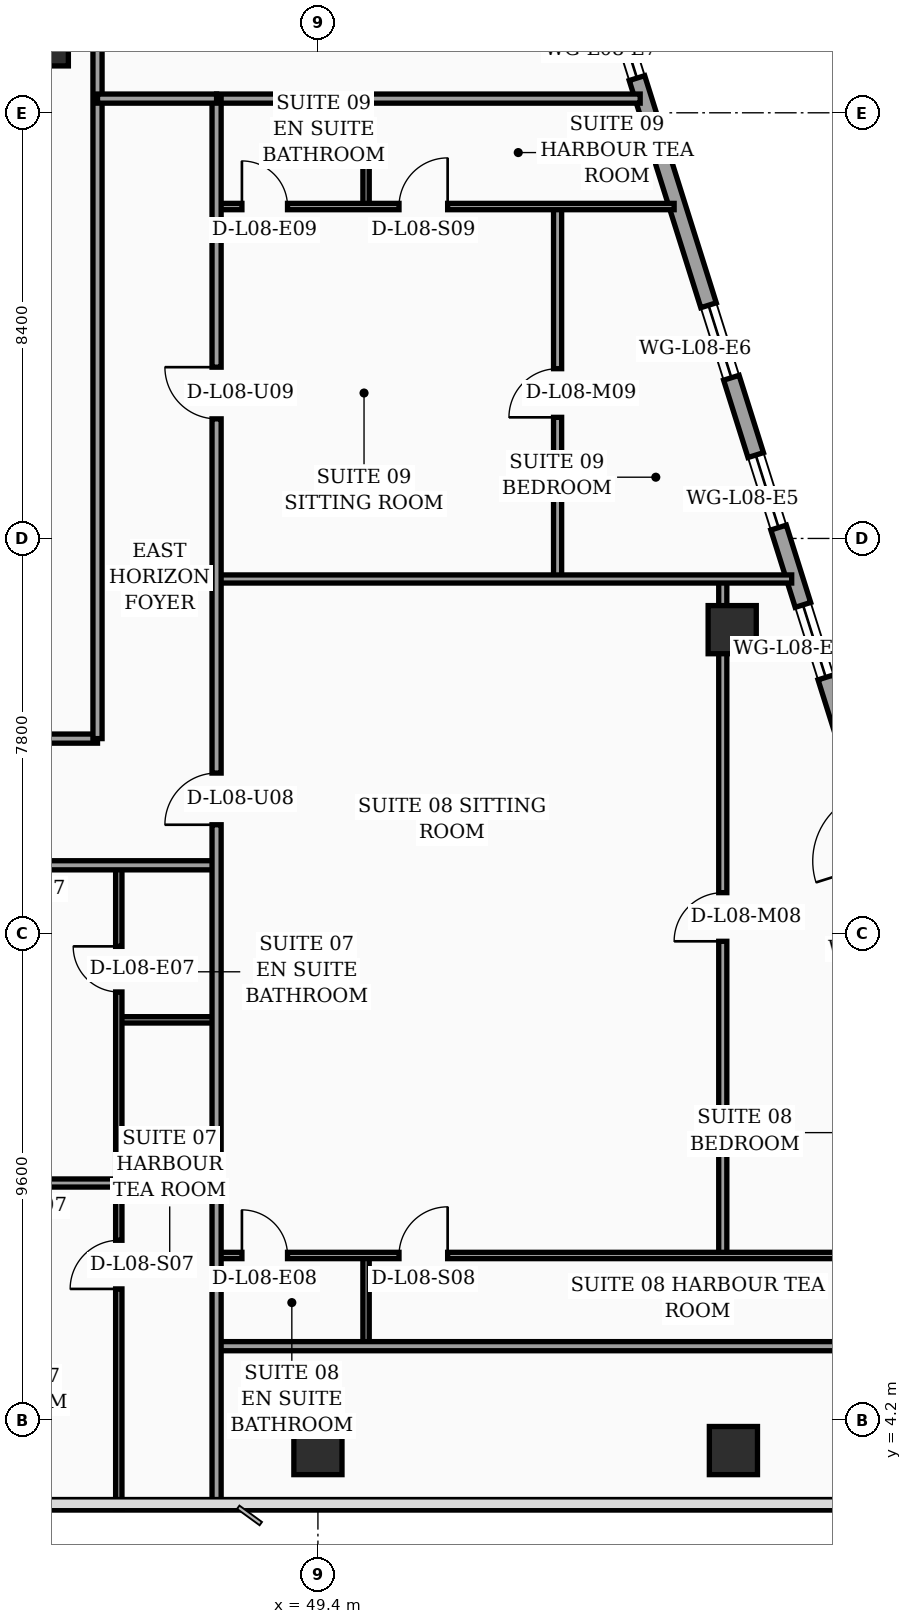
"""IFC4 building model, lengths in metres.
Left out: names, types, materials, properties, quantities, classifications, styles, units other than length and angle.
Written with IfcOpenShell. Run it as: python <this file> out.ifc"""

import sys

from ifc_helpers import new_model, si_unit, direction, frame, frame_2d, origin, origin_2d, place, context, subcontext, project, spatial, rectangle, hollow_rectangle, extrude, element, fill, save


model = new_model("IFC4")
c1 = context("Model", 3, precision=1e-05, world=origin(), true_north=direction((0.0, 1.0)))
c2 = subcontext(c1, "Body", "Model", "MODEL_VIEW")
j1 = project(units=[si_unit("LENGTHUNIT", "METRE"), si_unit("PLANEANGLEUNIT", "RADIAN")], contexts=[c1])
p1 = place(None, origin())
s1 = spatial("IfcSite", under=j1, at=p1, CompositionType="ELEMENT")
p2 = place(p1, origin())
s2 = spatial("IfcBuilding", under=s1, at=p2, CompositionType="ELEMENT")
p3 = place(p2, frame((0.0, 0.0, 38.4)))
s3 = spatial("IfcBuildingStorey", under=s2, at=p3, CompositionType="ELEMENT", Elevation=38.4)
for number, where, z_axis, x_axis in (
    (1, (49.4, 3.6, 0.0), (0.0, 0.0, 1.0), (1.0, 0.0, 0.0)),
    (2, (57.6, 3.6, 0.0), (0.0, 0.0, 1.0), (1.0, 0.0, 0.0)),
    (3, (44.0, 31.4, 0.0), (0.0, 0.0, 1.0), (1.0, 0.0, 0.0)),
    (4, (57.576, 19.8, 0.0), (0.0, 0.0, 1.0), (1.0, 0.0, 0.0)),
):
    element("IfcColumn", number, at=place(p3, frame(where, z_axis=z_axis, x_axis=x_axis)), inside=s3, PredefinedType="COLUMN", context=c2, shape_type="SweptSolid", body=[
        extrude(hollow_rectangle(XDim=0.95, YDim=0.95, WallThickness=0.04, at=origin_2d()), origin(), (0.0, 0.0, 1.0), 3.56),
    ])
p4 = place(p3, frame((63.63, 5.505, 0.0), z_axis=(0.0, 0.0, 1.0), x_axis=(-0.300501856448, 0.953781229775, 0.0)))
e5 = element("IfcWall", 5, at=p4, inside=s3, PredefinedType="SOLIDWALL", context=c2, shape_type="SweptSolid", body=[
    extrude(rectangle(XDim=30.814, YDim=0.32, at=frame_2d((15.407, 0.0))), origin(), (0.0, 0.0, 1.0), 3.56),
])
p5 = place(p4, frame((10.199, 0.0, 0.0)))
e6 = element("IfcOpeningElement", 6, at=p5, cuts=e5, PredefinedType="OPENING", context=c2, shape_type="SweptSolid", body=[
    extrude(rectangle(XDim=1.4, YDim=2.25, at=frame_2d((0.7, 1.125))), frame((0.0, 0.17, 0.0), z_axis=(0.0, -1.0, 0.0), x_axis=(1.0, 0.0, 0.0)), (0.0, 0.0, 1.0), 0.34),
])
p6 = place(p4, frame((2.65, 0.0, 0.75)))
e7 = element("IfcOpeningElement", 7, at=p6, cuts=e5, PredefinedType="OPENING", context=c2, shape_type="SweptSolid", body=[
    extrude(rectangle(XDim=1.5, YDim=1.6, at=frame_2d((0.75, 0.8))), frame((0.0, 0.17, 0.0), z_axis=(0.0, -1.0, 0.0), x_axis=(1.0, 0.0, 0.0)), (0.0, 0.0, 1.0), 0.34),
])
p7 = place(p4, frame((4.7, 0.0, 0.75)))
e8 = element("IfcOpeningElement", 8, at=p7, cuts=e5, PredefinedType="OPENING", context=c2, shape_type="SweptSolid", body=[
    extrude(rectangle(XDim=1.5, YDim=1.6, at=frame_2d((0.75, 0.8))), frame((0.0, 0.17, 0.0), z_axis=(0.0, -1.0, 0.0), x_axis=(1.0, 0.0, 0.0)), (0.0, 0.0, 1.0), 0.34),
])
p8 = place(p4, frame((7.8, 0.0, 0.75)))
e9 = element("IfcOpeningElement", 9, at=p8, cuts=e5, PredefinedType="OPENING", context=c2, shape_type="SweptSolid", body=[
    extrude(rectangle(XDim=1.5, YDim=1.6, at=frame_2d((0.75, 0.8))), frame((0.0, 0.17, 0.0), z_axis=(0.0, -1.0, 0.0), x_axis=(1.0, 0.0, 0.0)), (0.0, 0.0, 1.0), 0.34),
])
p9 = place(p4, frame((14.0, 0.0, 0.75)))
e10 = element("IfcOpeningElement", 10, at=p9, cuts=e5, PredefinedType="OPENING", context=c2, shape_type="SweptSolid", body=[
    extrude(rectangle(XDim=1.5, YDim=1.6, at=frame_2d((0.75, 0.8))), frame((0.0, 0.17, 0.0), z_axis=(0.0, -1.0, 0.0), x_axis=(1.0, 0.0, 0.0)), (0.0, 0.0, 1.0), 0.34),
])
p10 = place(p4, frame((17.1, 0.0, 0.75)))
e11 = element("IfcOpeningElement", 11, at=p10, cuts=e5, PredefinedType="OPENING", context=c2, shape_type="SweptSolid", body=[
    extrude(rectangle(XDim=1.5, YDim=1.6, at=frame_2d((0.75, 0.8))), frame((0.0, 0.17, 0.0), z_axis=(0.0, -1.0, 0.0), x_axis=(1.0, 0.0, 0.0)), (0.0, 0.0, 1.0), 0.34),
])
p11 = place(p4, frame((20.2, 0.0, 0.75)))
e12 = element("IfcOpeningElement", 12, at=p11, cuts=e5, PredefinedType="OPENING", context=c2, shape_type="SweptSolid", body=[
    extrude(rectangle(XDim=1.5, YDim=1.6, at=frame_2d((0.75, 0.8))), frame((0.0, 0.17, 0.0), z_axis=(0.0, -1.0, 0.0), x_axis=(1.0, 0.0, 0.0)), (0.0, 0.0, 1.0), 0.34),
])
p12 = place(p4, frame((26.4, 0.0, 0.75)))
e13 = element("IfcOpeningElement", 13, at=p12, cuts=e5, PredefinedType="OPENING", context=c2, shape_type="SweptSolid", body=[
    extrude(rectangle(XDim=1.5, YDim=1.6, at=frame_2d((0.75, 0.8))), frame((0.0, 0.17, 0.0), z_axis=(0.0, -1.0, 0.0), x_axis=(1.0, 0.0, 0.0)), (0.0, 0.0, 1.0), 0.34),
])
p13 = place(p3, frame((45.47, 12.1, 0.0), z_axis=(0.0, 0.0, 1.0), x_axis=(1.0, 0.0, 0.0)))
e14 = element("IfcWall", 14, at=p13, inside=s3, PredefinedType="PARTITIONING", context=c2, shape_type="SweptSolid", body=[
    extrude(rectangle(XDim=1.93, YDim=0.125, at=frame_2d((0.965, 0.0))), origin(), (0.0, 0.0, 1.0), 2.84),
])
p14 = place(p3, frame((41.25, 8.88, 0.0), z_axis=(0.0, 0.0, 1.0), x_axis=(1.0, 0.0, 0.0)))
e15 = element("IfcWall", 15, at=p14, inside=s3, PredefinedType="PARTITIONING", context=c2, shape_type="SweptSolid", body=[
    extrude(rectangle(XDim=4.22, YDim=0.16, at=frame_2d((2.11, 0.0))), origin(), (0.0, 0.0, 1.0), 3.56),
])
p15 = place(p14, frame((1.63, 0.0, 0.0)))
e16 = element("IfcOpeningElement", 16, at=p15, cuts=e15, PredefinedType="OPENING", context=c2, shape_type="SweptSolid", body=[
    extrude(rectangle(XDim=0.96, YDim=2.2, at=frame_2d((0.48, 1.1))), frame((0.0, 0.09, 0.0), z_axis=(0.0, -1.0, 0.0), x_axis=(1.0, 0.0, 0.0)), (0.0, 0.0, 1.0), 0.18),
])
p16 = place(p3, frame((45.47, 2.44, 0.0), z_axis=(0.0, 0.0, 1.0), x_axis=(0.0, 1.0, 0.0)))
e17 = element("IfcWall", 17, at=p16, inside=s3, PredefinedType="PARTITIONING", context=c2, shape_type="SweptSolid", body=[
    extrude(rectangle(XDim=12.71, YDim=0.125, at=frame_2d((6.355, 0.0))), origin(), (0.0, 0.0, 1.0), 3.04),
])
p17 = place(p16, frame((4.35, 0.0, 0.0)))
e18 = element("IfcOpeningElement", 18, at=p17, cuts=e17, PredefinedType="OPENING", context=c2, shape_type="SweptSolid", body=[
    extrude(rectangle(XDim=0.96, YDim=2.2, at=frame_2d((0.48, 1.1))), frame((0.0, 0.073, 0.0), z_axis=(0.0, -1.0, 0.0), x_axis=(1.0, 0.0, 0.0)), (0.0, 0.0, 1.0), 0.145),
])
p18 = place(p16, frame((10.21, 0.0, 0.0)))
e19 = element("IfcOpeningElement", 19, at=p18, cuts=e17, PredefinedType="OPENING", context=c2, shape_type="SweptSolid", body=[
    extrude(rectangle(XDim=0.9, YDim=2.15, at=frame_2d((0.45, 1.075))), frame((0.0, 0.073, 0.0), z_axis=(0.0, -1.0, 0.0), x_axis=(1.0, 0.0, 0.0)), (0.0, 0.0, 1.0), 0.145),
])
p19 = place(p3, frame((32.4, 15.15, 0.0), z_axis=(0.0, 0.0, 1.0), x_axis=(1.0, 0.0, 0.0)))
e20 = element("IfcWall", 20, at=p19, inside=s3, PredefinedType="PARTITIONING", context=c2, shape_type="SweptSolid", body=[
    extrude(rectangle(XDim=15.0, YDim=0.18, at=frame_2d((7.5, 0.0))), origin(), (0.0, 0.0, 1.0), 2.84),
])
p20 = place(p19, frame((2.95, 0.0, 0.0)))
e21 = element("IfcOpeningElement", 21, at=p20, cuts=e20, PredefinedType="OPENING", context=c2, shape_type="SweptSolid", body=[
    extrude(rectangle(XDim=1.02, YDim=2.2, at=frame_2d((0.51, 1.1))), frame((0.0, 0.1, 0.0), z_axis=(0.0, -1.0, 0.0), x_axis=(1.0, 0.0, 0.0)), (0.0, 0.0, 1.0), 0.2),
])
p21 = place(p19, frame((10.45, 0.0, 0.0)))
e22 = element("IfcOpeningElement", 22, at=p21, cuts=e20, PredefinedType="OPENING", context=c2, shape_type="SweptSolid", body=[
    extrude(rectangle(XDim=1.02, YDim=2.2, at=frame_2d((0.51, 1.1))), frame((0.0, 0.1, 0.0), z_axis=(0.0, -1.0, 0.0), x_axis=(1.0, 0.0, 0.0)), (0.0, 0.0, 1.0), 0.2),
])
p22 = place(p3, frame((21.5, 17.65, 0.0), z_axis=(0.0, 0.0, 1.0), x_axis=(1.0, 0.0, 0.0)))
e23 = element("IfcWall", 23, at=p22, inside=s3, PredefinedType="PARTITIONING", context=c2, shape_type="SweptSolid", body=[
    extrude(rectangle(XDim=23.55, YDim=0.18, at=frame_2d((11.775, 0.0))), origin(), (0.0, 0.0, 1.0), 2.84),
])
p23 = place(p22, frame((0.95, 0.0, 0.0)))
e24 = element("IfcOpeningElement", 24, at=p23, cuts=e23, PredefinedType="OPENING", context=c2, shape_type="SweptSolid", body=[
    extrude(rectangle(XDim=1.02, YDim=2.2, at=frame_2d((0.51, 1.1))), frame((0.0, 0.1, 0.0), z_axis=(0.0, -1.0, 0.0), x_axis=(1.0, 0.0, 0.0)), (0.0, 0.0, 1.0), 0.2),
])
p24 = place(p22, frame((9.42, 0.0, 0.0)))
e25 = element("IfcOpeningElement", 25, at=p24, cuts=e23, PredefinedType="OPENING", context=c2, shape_type="SweptSolid", body=[
    extrude(rectangle(XDim=1.02, YDim=2.2, at=frame_2d((0.51, 1.1))), frame((0.0, 0.1, 0.0), z_axis=(0.0, -1.0, 0.0), x_axis=(1.0, 0.0, 0.0)), (0.0, 0.0, 1.0), 0.2),
])
p25 = place(p22, frame((16.58, 0.0, 0.0)))
e26 = element("IfcOpeningElement", 26, at=p25, cuts=e23, PredefinedType="OPENING", context=c2, shape_type="SweptSolid", body=[
    extrude(rectangle(XDim=1.02, YDim=2.2, at=frame_2d((0.51, 1.1))), frame((0.0, 0.1, 0.0), z_axis=(0.0, -1.0, 0.0), x_axis=(1.0, 0.0, 0.0)), (0.0, 0.0, 1.0), 0.2),
])
p26 = place(p3, frame((45.05, 17.65, 0.0), z_axis=(0.0, 0.0, 1.0), x_axis=(0.0, 1.0, 0.0)))
e27 = element("IfcWall", 27, at=p26, inside=s3, PredefinedType="PARTITIONING", context=c2, shape_type="SweptSolid", body=[
    extrude(rectangle(XDim=17.9, YDim=0.18, at=frame_2d((8.95, 0.0))), origin(), (0.0, 0.0, 1.0), 2.84),
])
p27 = place(p3, frame((50.35, 5.66, 0.0), z_axis=(0.0, 0.0, 1.0), x_axis=(0.0, 1.0, 0.0)))
e28 = element("IfcWall", 28, at=p27, inside=s3, PredefinedType="PARTITIONING", context=c2, shape_type="SweptSolid", body=[
    extrude(rectangle(XDim=1.79, YDim=0.125, at=frame_2d((0.895, 0.0))), origin(), (0.0, 0.0, 1.0), 3.56),
])
p28 = place(p3, frame((57.39, 7.45, 0.0), z_axis=(0.0, 0.0, 1.0), x_axis=(0.0, 1.0, 0.0)))
e29 = element("IfcWall", 29, at=p28, inside=s3, PredefinedType="PARTITIONING", context=c2, shape_type="SweptSolid", body=[
    extrude(rectangle(XDim=13.35, YDim=0.16, at=frame_2d((6.675, 0.0))), origin(), (0.0, 0.0, 1.0), 2.84),
])
p29 = place(p28, frame((6.2, 0.0, 0.0)))
e30 = element("IfcOpeningElement", 30, at=p29, cuts=e29, PredefinedType="OPENING", context=c2, shape_type="SweptSolid", body=[
    extrude(rectangle(XDim=0.96, YDim=2.2, at=frame_2d((0.48, 1.1))), frame((0.0, 0.09, 0.0), z_axis=(0.0, -1.0, 0.0), x_axis=(1.0, 0.0, 0.0)), (0.0, 0.0, 1.0), 0.18),
])
p30 = place(p3, frame((47.4, 7.45, 0.0), z_axis=(0.0, 0.0, 1.0), x_axis=(1.0, 0.0, 0.0)))
e31 = element("IfcWall", 31, at=p30, inside=s3, PredefinedType="PARTITIONING", context=c2, shape_type="SweptSolid", body=[
    extrude(rectangle(XDim=15.56, YDim=0.125, at=frame_2d((7.78, 0.0))), origin(), (0.0, 0.0, 1.0), 2.84),
])
p31 = place(p30, frame((0.5, 0.0, 0.0)))
e32 = element("IfcOpeningElement", 32, at=p31, cuts=e31, PredefinedType="OPENING", context=c2, shape_type="SweptSolid", body=[
    extrude(rectangle(XDim=0.9, YDim=2.15, at=frame_2d((0.45, 1.075))), frame((0.0, 0.073, 0.0), z_axis=(0.0, -1.0, 0.0), x_axis=(1.0, 0.0, 0.0)), (0.0, 0.0, 1.0), 0.145),
])
p32 = place(p30, frame((3.6, 0.0, 0.0)))
e33 = element("IfcOpeningElement", 33, at=p32, cuts=e31, PredefinedType="OPENING", context=c2, shape_type="SweptSolid", body=[
    extrude(rectangle(XDim=0.96, YDim=2.2, at=frame_2d((0.48, 1.1))), frame((0.0, 0.073, 0.0), z_axis=(0.0, -1.0, 0.0), x_axis=(1.0, 0.0, 0.0)), (0.0, 0.0, 1.0), 0.145),
])
p33 = place(p3, frame((47.4, 5.66, 0.0), z_axis=(0.0, 0.0, 1.0), x_axis=(1.0, 0.0, 0.0)))
e34 = element("IfcWall", 34, at=p33, inside=s3, PredefinedType="PARTITIONING", context=c2, shape_type="SweptSolid", body=[
    extrude(rectangle(XDim=13.0, YDim=0.18, at=frame_2d((6.5, 0.0))), origin(), (0.0, 0.0, 1.0), 2.84),
])
p34 = place(p3, frame((50.35, 28.15, 0.0), z_axis=(0.0, 0.0, 1.0), x_axis=(0.0, 1.0, 0.0)))
e35 = element("IfcWall", 35, at=p34, inside=s3, PredefinedType="PARTITIONING", context=c2, shape_type="SweptSolid", body=[
    extrude(rectangle(XDim=2.13, YDim=0.125, at=frame_2d((1.065, 0.0))), origin(), (0.0, 0.0, 1.0), 3.56),
])
p35 = place(p3, frame((54.13, 20.8, 0.0), z_axis=(0.0, 0.0, 1.0), x_axis=(0.0, 1.0, 0.0)))
e36 = element("IfcWall", 36, at=p35, inside=s3, PredefinedType="PARTITIONING", context=c2, shape_type="SweptSolid", body=[
    extrude(rectangle(XDim=7.35, YDim=0.16, at=frame_2d((3.675, 0.0))), origin(), (0.0, 0.0, 1.0), 3.09),
])
p36 = place(p35, frame((3.19, 0.0, 0.0)))
e37 = element("IfcOpeningElement", 37, at=p36, cuts=e36, PredefinedType="OPENING", context=c2, shape_type="SweptSolid", body=[
    extrude(rectangle(XDim=0.96, YDim=2.2, at=frame_2d((0.48, 1.1))), frame((0.0, 0.09, 0.0), z_axis=(0.0, -1.0, 0.0), x_axis=(1.0, 0.0, 0.0)), (0.0, 0.0, 1.0), 0.18),
])
p37 = place(p3, frame((47.4, 28.15, 0.0), z_axis=(0.0, 0.0, 1.0), x_axis=(1.0, 0.0, 0.0)))
e38 = element("IfcWall", 38, at=p37, inside=s3, PredefinedType="PARTITIONING", context=c2, shape_type="SweptSolid", body=[
    extrude(rectangle(XDim=9.03, YDim=0.125, at=frame_2d((4.515, 0.0))), origin(), (0.0, 0.0, 1.0), 2.84),
])
p38 = place(p37, frame((0.5, 0.0, 0.0)))
e39 = element("IfcOpeningElement", 39, at=p38, cuts=e38, PredefinedType="OPENING", context=c2, shape_type="SweptSolid", body=[
    extrude(rectangle(XDim=0.9, YDim=2.15, at=frame_2d((0.45, 1.075))), frame((0.0, 0.073, 0.0), z_axis=(0.0, -1.0, 0.0), x_axis=(1.0, 0.0, 0.0)), (0.0, 0.0, 1.0), 0.145),
])
p39 = place(p37, frame((3.6, 0.0, 0.0)))
e40 = element("IfcOpeningElement", 40, at=p39, cuts=e38, PredefinedType="OPENING", context=c2, shape_type="SweptSolid", body=[
    extrude(rectangle(XDim=0.96, YDim=2.2, at=frame_2d((0.48, 1.1))), frame((0.0, 0.073, 0.0), z_axis=(0.0, -1.0, 0.0), x_axis=(1.0, 0.0, 0.0)), (0.0, 0.0, 1.0), 0.145),
])
p40 = place(p3, frame((47.4, 20.8, 0.0), z_axis=(0.0, 0.0, 1.0), x_axis=(1.0, 0.0, 0.0)))
e41 = element("IfcWall", 41, at=p40, inside=s3, PredefinedType="PARTITIONING", context=c2, shape_type="SweptSolid", body=[
    extrude(rectangle(XDim=11.35, YDim=0.16, at=frame_2d((5.675, 0.0))), origin(), (0.0, 0.0, 1.0), 3.04),
])
p41 = place(p3, frame((47.4, 30.28, 0.0), z_axis=(0.0, 0.0, 1.0), x_axis=(1.0, 0.0, 0.0)))
e42 = element("IfcWall", 42, at=p41, inside=s3, PredefinedType="PARTITIONING", context=c2, shape_type="SweptSolid", body=[
    extrude(rectangle(XDim=8.36, YDim=0.18, at=frame_2d((4.18, 0.0))), origin(), (0.0, 0.0, 1.0), 2.84),
])
p42 = place(p3, frame((47.4, 2.44, 0.0), z_axis=(0.0, 0.0, 1.0), x_axis=(0.0, 1.0, 0.0)))
e43 = element("IfcWall", 43, at=p42, inside=s3, PredefinedType="PARTITIONING", context=c2, shape_type="SweptSolid", body=[
    extrude(rectangle(XDim=27.84, YDim=0.18, at=frame_2d((13.92, 0.0))), origin(), (0.0, 0.0, 1.0), 2.84),
])
p43 = place(p42, frame((13.51, 0.0, 0.0)))
e44 = element("IfcOpeningElement", 44, at=p43, cuts=e43, PredefinedType="OPENING", context=c2, shape_type="SweptSolid", body=[
    extrude(rectangle(XDim=1.02, YDim=2.2, at=frame_2d((0.51, 1.1))), frame((0.0, 0.1, 0.0), z_axis=(0.0, -1.0, 0.0), x_axis=(1.0, 0.0, 0.0)), (0.0, 0.0, 1.0), 0.2),
])
p44 = place(p42, frame((21.52, 0.0, 0.0)))
e45 = element("IfcOpeningElement", 45, at=p44, cuts=e43, PredefinedType="OPENING", context=c2, shape_type="SweptSolid", body=[
    extrude(rectangle(XDim=1.02, YDim=2.2, at=frame_2d((0.51, 1.1))), frame((0.0, 0.1, 0.0), z_axis=(0.0, -1.0, 0.0), x_axis=(1.0, 0.0, 0.0)), (0.0, 0.0, 1.0), 0.2),
])
p45 = place(p3, frame((45.05, 30.28, 0.0), z_axis=(0.0, 0.0, 1.0), x_axis=(1.0, 0.0, 0.0)))
e46 = element("IfcWall", 46, at=p45, inside=s3, PredefinedType="PARTITIONING", context=c2, shape_type="SweptSolid", body=[
    extrude(rectangle(XDim=2.35, YDim=0.18, at=frame_2d((1.175, 0.0))), origin(), (0.0, 0.0, 1.0), 3.56),
])
p46 = place(p9, origin())
e47 = element("IfcWindow", 47, at=p46, inside=s3, PartitioningType="SINGLE_PANEL", PredefinedType="WINDOW", context=c2, shape_type="SweptSolid", body=[
    extrude(rectangle(XDim=1.5, YDim=1.6, at=frame_2d((0.75, 0.8))), frame((0.0, 0.03, 0.0), z_axis=(0.0, -1.0, 0.0), x_axis=(1.0, 0.0, 0.0)), (0.0, 0.0, 1.0), 0.06),
])
fill(e10, e47)
p47 = place(p10, origin())
e48 = element("IfcWindow", 48, at=p47, inside=s3, PartitioningType="SINGLE_PANEL", PredefinedType="WINDOW", context=c2, shape_type="SweptSolid", body=[
    extrude(rectangle(XDim=1.5, YDim=1.6, at=frame_2d((0.75, 0.8))), frame((0.0, 0.03, 0.0), z_axis=(0.0, -1.0, 0.0), x_axis=(1.0, 0.0, 0.0)), (0.0, 0.0, 1.0), 0.06),
])
fill(e11, e48)
p48 = place(p11, origin())
e49 = element("IfcWindow", 49, at=p48, inside=s3, PartitioningType="SINGLE_PANEL", PredefinedType="WINDOW", context=c2, shape_type="SweptSolid", body=[
    extrude(rectangle(XDim=1.5, YDim=1.6, at=frame_2d((0.75, 0.8))), frame((0.0, 0.03, 0.0), z_axis=(0.0, -1.0, 0.0), x_axis=(1.0, 0.0, 0.0)), (0.0, 0.0, 1.0), 0.06),
])
fill(e12, e49)
p49 = place(p12, origin())
e50 = element("IfcWindow", 50, at=p49, inside=s3, PartitioningType="SINGLE_PANEL", PredefinedType="WINDOW", context=c2, shape_type="SweptSolid", body=[
    extrude(rectangle(XDim=1.5, YDim=1.6, at=frame_2d((0.75, 0.8))), frame((0.0, 0.03, 0.0), z_axis=(0.0, -1.0, 0.0), x_axis=(1.0, 0.0, 0.0)), (0.0, 0.0, 1.0), 0.06),
])
fill(e13, e50)
p50 = place(p17, origin())
e51 = element("IfcDoor", 51, at=p50, inside=s3, OperationType="SINGLE_SWING_LEFT", PredefinedType="DOOR", context=c2, shape_type="SweptSolid", body=[
    extrude(rectangle(XDim=0.96, YDim=2.2, at=frame_2d((0.48, 1.1))), frame((0.0, 0.025, 0.0), z_axis=(0.0, -1.0, 0.0), x_axis=(1.0, 0.0, 0.0)), (0.0, 0.0, 1.0), 0.05),
])
fill(e18, e51)
p51 = place(p18, origin())
e52 = element("IfcDoor", 52, at=p51, inside=s3, OperationType="SINGLE_SWING_RIGHT", PredefinedType="DOOR", context=c2, shape_type="SweptSolid", body=[
    extrude(rectangle(XDim=0.9, YDim=2.15, at=frame_2d((0.45, 1.075))), frame((0.0, 0.025, 0.0), z_axis=(0.0, -1.0, 0.0), x_axis=(1.0, 0.0, 0.0)), (0.0, 0.0, 1.0), 0.05),
])
fill(e19, e52)
p52 = place(p29, origin())
e53 = element("IfcDoor", 53, at=p52, inside=s3, OperationType="SINGLE_SWING_LEFT", PredefinedType="DOOR", context=c2, shape_type="SweptSolid", body=[
    extrude(rectangle(XDim=0.96, YDim=2.2, at=frame_2d((0.48, 1.1))), frame((0.0, 0.025, 0.0), z_axis=(0.0, -1.0, 0.0), x_axis=(1.0, 0.0, 0.0)), (0.0, 0.0, 1.0), 0.05),
])
fill(e30, e53)
p53 = place(p31, origin())
e54 = element("IfcDoor", 54, at=p53, inside=s3, OperationType="SINGLE_SWING_LEFT", PredefinedType="DOOR", context=c2, shape_type="SweptSolid", body=[
    extrude(rectangle(XDim=0.9, YDim=2.15, at=frame_2d((0.45, 1.075))), frame((0.0, 0.025, 0.0), z_axis=(0.0, -1.0, 0.0), x_axis=(1.0, 0.0, 0.0)), (0.0, 0.0, 1.0), 0.05),
])
fill(e32, e54)
p54 = place(p32, origin())
e55 = element("IfcDoor", 55, at=p54, inside=s3, OperationType="SINGLE_SWING_RIGHT", PredefinedType="DOOR", context=c2, shape_type="SweptSolid", body=[
    extrude(rectangle(XDim=0.96, YDim=2.2, at=frame_2d((0.48, 1.1))), frame((0.0, 0.025, 0.0), z_axis=(0.0, -1.0, 0.0), x_axis=(1.0, 0.0, 0.0)), (0.0, 0.0, 1.0), 0.05),
])
fill(e33, e55)
p55 = place(p36, origin())
e56 = element("IfcDoor", 56, at=p55, inside=s3, OperationType="SINGLE_SWING_LEFT", PredefinedType="DOOR", context=c2, shape_type="SweptSolid", body=[
    extrude(rectangle(XDim=0.96, YDim=2.2, at=frame_2d((0.48, 1.1))), frame((0.0, 0.025, 0.0), z_axis=(0.0, -1.0, 0.0), x_axis=(1.0, 0.0, 0.0)), (0.0, 0.0, 1.0), 0.05),
])
fill(e37, e56)
p56 = place(p38, origin())
e57 = element("IfcDoor", 57, at=p56, inside=s3, OperationType="SINGLE_SWING_LEFT", PredefinedType="DOOR", context=c2, shape_type="SweptSolid", body=[
    extrude(rectangle(XDim=0.9, YDim=2.15, at=frame_2d((0.45, 1.075))), frame((0.0, 0.025, 0.0), z_axis=(0.0, -1.0, 0.0), x_axis=(1.0, 0.0, 0.0)), (0.0, 0.0, 1.0), 0.05),
])
fill(e39, e57)
p57 = place(p39, origin())
e58 = element("IfcDoor", 58, at=p57, inside=s3, OperationType="SINGLE_SWING_RIGHT", PredefinedType="DOOR", context=c2, shape_type="SweptSolid", body=[
    extrude(rectangle(XDim=0.96, YDim=2.2, at=frame_2d((0.48, 1.1))), frame((0.0, 0.025, 0.0), z_axis=(0.0, -1.0, 0.0), x_axis=(1.0, 0.0, 0.0)), (0.0, 0.0, 1.0), 0.05),
])
fill(e40, e58)
p58 = place(p43, origin())
e59 = element("IfcDoor", 59, at=p58, inside=s3, OperationType="SINGLE_SWING_LEFT", PredefinedType="DOOR", context=c2, shape_type="SweptSolid", body=[
    extrude(rectangle(XDim=1.02, YDim=2.2, at=frame_2d((0.51, 1.1))), frame((0.0, 0.025, 0.0), z_axis=(0.0, -1.0, 0.0), x_axis=(1.0, 0.0, 0.0)), (0.0, 0.0, 1.0), 0.05),
])
fill(e44, e59)
p59 = place(p44, origin())
e60 = element("IfcDoor", 60, at=p59, inside=s3, OperationType="SINGLE_SWING_RIGHT", PredefinedType="DOOR", context=c2, shape_type="SweptSolid", body=[
    extrude(rectangle(XDim=1.02, YDim=2.2, at=frame_2d((0.51, 1.1))), frame((0.0, 0.025, 0.0), z_axis=(0.0, -1.0, 0.0), x_axis=(1.0, 0.0, 0.0)), (0.0, 0.0, 1.0), 0.05),
])
fill(e45, e60)
save(model, sys.argv[1])
